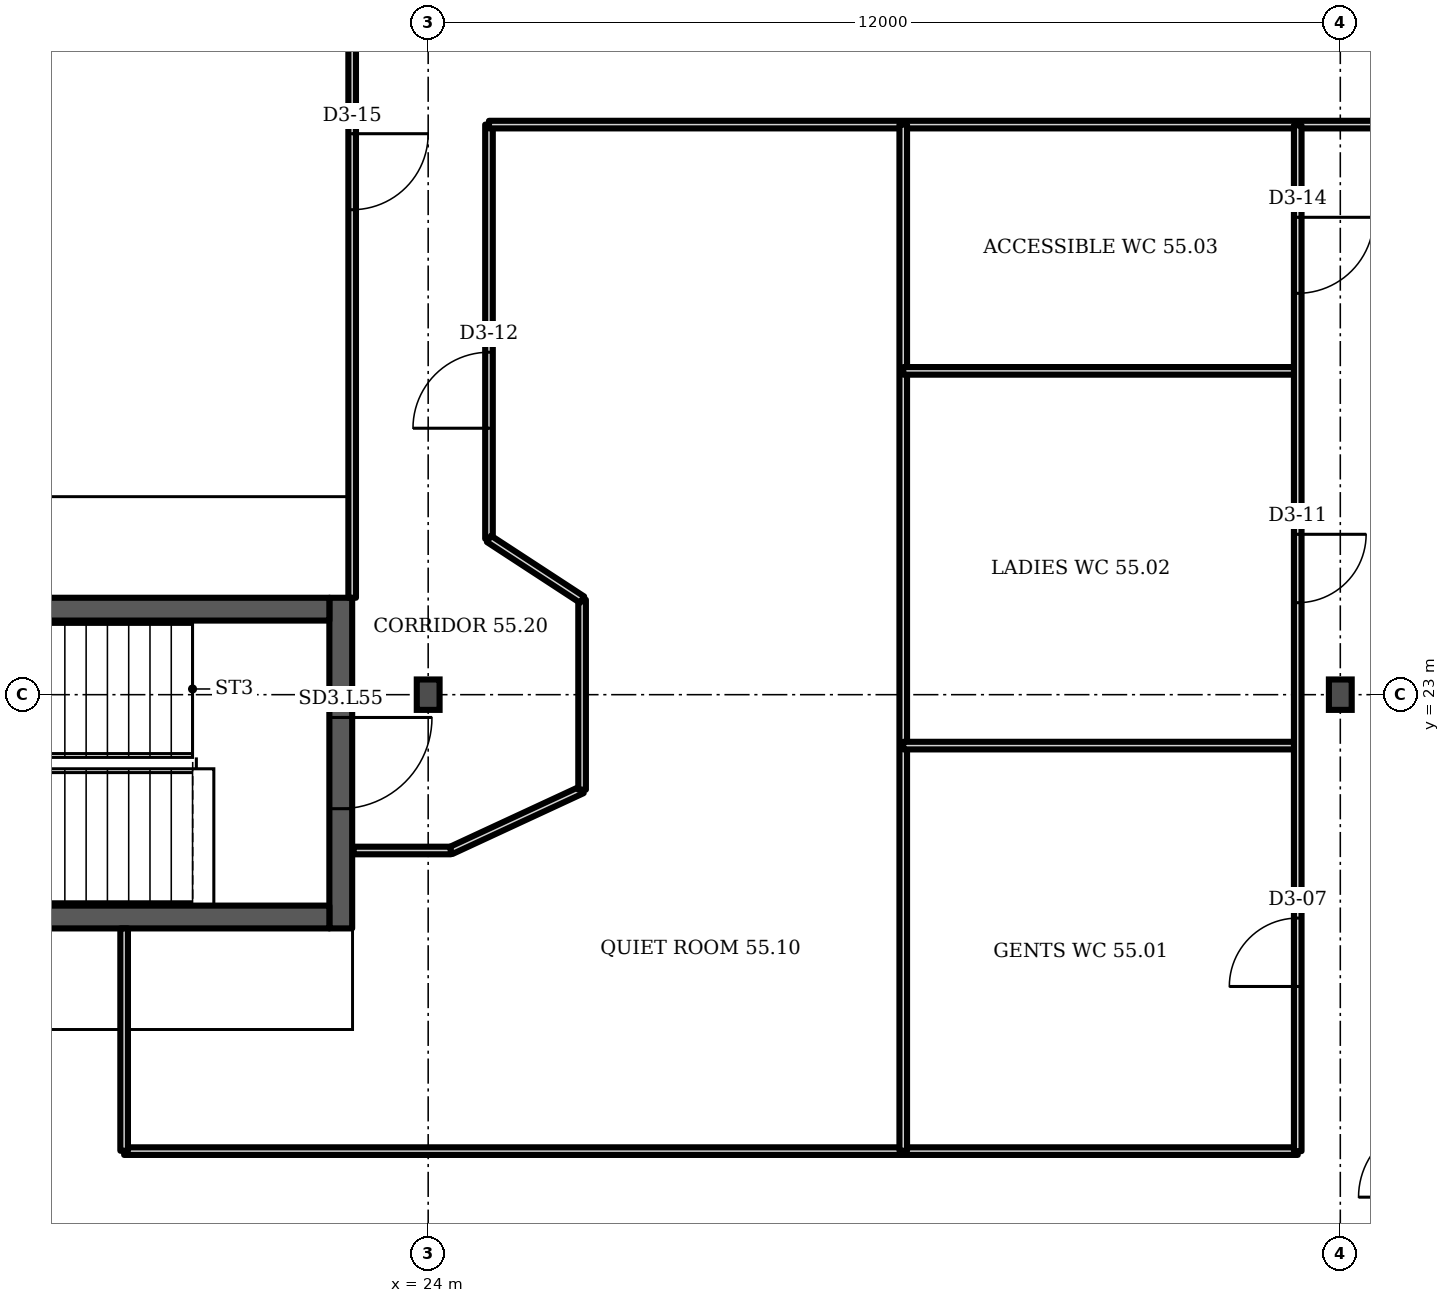
"""IFC4 building model, lengths in metres.
Left out: names, types, materials, properties, quantities, classifications, styles, units other than length and angle.
Written with IfcOpenShell. Run it as: python <this file> out.ifc"""

import sys

from ifc_helpers import new_model, si_unit, direction, frame, frame_2d, origin, origin_2d, place, context, subcontext, project, spatial, rectangle, i_section, extrude, element, fill, save


model = new_model("IFC4")
c1 = context("Model", 3, precision=1e-05, world=origin(), true_north=direction((0.0, 1.0)))
c2 = subcontext(c1, "Body", "Model", "MODEL_VIEW")
j1 = project(units=[si_unit("LENGTHUNIT", "METRE"), si_unit("PLANEANGLEUNIT", "RADIAN")], contexts=[c1])
p1 = place(None, origin())
s1 = spatial("IfcSite", under=j1, at=p1, CompositionType="ELEMENT")
p2 = place(p1, origin())
s2 = spatial("IfcBuilding", under=s1, at=p2, CompositionType="ELEMENT")
p3 = place(p2, frame((0.0, 0.0, 221.5)))
s3 = spatial("IfcBuildingStorey", under=s2, at=p3, CompositionType="ELEMENT", Elevation=221.5)
for number, where, z_axis, x_axis in (
    (1, (24.0, 23.0, 0.0), (0.0, 0.0, 1.0), (1.0, 0.0, 0.0)),
    (2, (36.0, 23.0, 0.0), (0.0, 0.0, 1.0), (1.0, 0.0, 0.0)),
):
    element("IfcColumn", number, at=place(p3, frame(where, z_axis=z_axis, x_axis=x_axis)), inside=s3, PredefinedType="COLUMN", context=c2, shape_type="SweptSolid", body=[
        extrude(i_section(OverallWidth=0.3, OverallDepth=0.4, WebThickness=0.013, FlangeThickness=0.024, FilletRadius=0.027, at=origin_2d()), origin(), (0.0, 0.0, 1.0), 3.6),
    ])
p4 = place(p3, frame((22.85, 19.925, 0.0), z_axis=(0.0, 0.0, 1.0), x_axis=(0.0, 1.0, 0.0)))
e3 = element("IfcWall", 3, at=p4, inside=s3, PredefinedType="SHEAR", context=c2, shape_type="SweptSolid", body=[
    extrude(rectangle(XDim=4.35, YDim=0.3, at=frame_2d((2.175, 0.0))), origin(), (0.0, 0.0, 1.0), 3.2),
])
p5 = place(p4, frame((1.575, 0.0, 0.0)))
e4 = element("IfcOpeningElement", 4, at=p5, cuts=e3, PredefinedType="OPENING", context=c2, shape_type="SweptSolid", body=[
    extrude(rectangle(XDim=1.2, YDim=2.1, at=frame_2d((0.6, 1.05))), frame((0.0, 0.16, 0.0), z_axis=(0.0, -1.0, 0.0), x_axis=(1.0, 0.0, 0.0)), (0.0, 0.0, 1.0), 0.32),
])
p6 = place(p3, frame((20.0, 16.995, 0.0), z_axis=(0.0, 0.0, 1.0), x_axis=(1.0, 0.0, 0.0)))
e5 = element("IfcWall", 5, at=p6, inside=s3, PredefinedType="PARTITIONING", context=c2, shape_type="SweptSolid", body=[
    extrude(rectangle(XDim=15.44, YDim=0.1, at=frame_2d((7.72, 0.0))), origin(), (0.0, 0.0, 1.0), 3.2),
])
p7 = place(p3, frame((20.0, 17.0, 0.0), z_axis=(0.0, 0.0, 1.0), x_axis=(0.0, 1.0, 0.0)))
e6 = element("IfcWall", 6, at=p7, inside=s3, PredefinedType="PARTITIONING", context=c2, shape_type="SweptSolid", body=[
    extrude(rectangle(XDim=2.925, YDim=0.1, at=frame_2d((1.462, 0.0))), origin(), (0.0, 0.0, 1.0), 3.2),
])
p8 = place(p3, frame((23.0, 24.275, 0.0), z_axis=(0.0, 0.0, 1.0), x_axis=(0.0, 1.0, 0.0)))
e7 = element("IfcWall", 7, at=p8, inside=s3, PredefinedType="PARTITIONING", context=c2, shape_type="SweptSolid", body=[
    extrude(rectangle(XDim=9.705, YDim=0.1, at=frame_2d((4.853, 0.0))), origin(), (0.0, 0.0, 1.0), 3.2),
])
p9 = place(p8, frame((5.105, 0.0, 0.0)))
e8 = element("IfcOpeningElement", 8, at=p9, cuts=e7, PredefinedType="OPENING", context=c2, shape_type="SweptSolid", body=[
    extrude(rectangle(XDim=1.0, YDim=2.1, at=frame_2d((0.5, 1.05))), frame((0.0, 0.06, 0.0), z_axis=(0.0, -1.0, 0.0), x_axis=(1.0, 0.0, 0.0)), (0.0, 0.0, 1.0), 0.12),
])
p10 = place(p3, frame((23.02, 20.95, 0.0), z_axis=(0.0, 0.0, 1.0), x_axis=(1.0, 0.0, 0.0)))
e9 = element("IfcWall", 9, at=p10, inside=s3, PredefinedType="PARTITIONING", context=c2, shape_type="SweptSolid", body=[
    extrude(rectangle(XDim=1.28, YDim=0.1, at=frame_2d((0.64, 0.0))), origin(), (0.0, 0.0, 1.0), 3.2),
])
p11 = place(p3, frame((24.3, 20.95, 0.0), z_axis=(0.0, 0.0, 1.0), x_axis=(0.907168, 0.420777, 0.0)))
e10 = element("IfcWall", 10, at=p11, inside=s3, PredefinedType="PARTITIONING", context=c2, shape_type="SweptSolid", body=[
    extrude(rectangle(XDim=1.901, YDim=0.1, at=frame_2d((0.951, 0.0))), origin(), (0.0, 0.0, 1.0), 3.2),
])
p12 = place(p3, frame((24.8, 25.05, 0.0), z_axis=(0.0, 0.0, 1.0), x_axis=(0.0, 1.0, 0.0)))
e11 = element("IfcWall", 11, at=p12, inside=s3, PredefinedType="PARTITIONING", context=c2, shape_type="SweptSolid", body=[
    extrude(rectangle(XDim=5.45, YDim=0.1, at=frame_2d((2.725, 0.0))), origin(), (0.0, 0.0, 1.0), 3.2),
])
p13 = place(p12, frame((1.455, 0.0, 0.0)))
e12 = element("IfcOpeningElement", 12, at=p13, cuts=e11, PredefinedType="OPENING", context=c2, shape_type="SweptSolid", body=[
    extrude(rectangle(XDim=1.0, YDim=2.1, at=frame_2d((0.5, 1.05))), frame((0.0, 0.06, 0.0), z_axis=(0.0, -1.0, 0.0), x_axis=(1.0, 0.0, 0.0)), (0.0, 0.0, 1.0), 0.12),
])
p14 = place(p3, frame((24.8, 30.5, 0.0), z_axis=(0.0, 0.0, 1.0), x_axis=(1.0, 0.0, 0.0)))
e13 = element("IfcWall", 13, at=p14, inside=s3, PredefinedType="PARTITIONING", context=c2, shape_type="SweptSolid", body=[
    extrude(rectangle(XDim=12.05, YDim=0.1, at=frame_2d((6.025, 0.0))), origin(), (0.0, 0.0, 1.0), 3.2),
])
p15 = place(p3, frame((26.025, 21.75, 0.0), z_axis=(0.0, 0.0, 1.0), x_axis=(0.0, 1.0, 0.0)))
e14 = element("IfcWall", 14, at=p15, inside=s3, PredefinedType="PARTITIONING", context=c2, shape_type="SweptSolid", body=[
    extrude(rectangle(XDim=2.5, YDim=0.1, at=frame_2d((1.25, 0.0))), origin(), (0.0, 0.0, 1.0), 3.2),
])
p16 = place(p3, frame((26.025, 24.25, 0.0), z_axis=(0.0, 0.0, 1.0), x_axis=(-0.837222, 0.546856, 0.0)))
e15 = element("IfcWall", 15, at=p16, inside=s3, PredefinedType="PARTITIONING", context=c2, shape_type="SweptSolid", body=[
    extrude(rectangle(XDim=1.463, YDim=0.1, at=frame_2d((0.731, 0.0))), origin(), (0.0, 0.0, 1.0), 3.2),
])
p17 = place(p3, frame((30.25, 17.0, 0.0), z_axis=(0.0, 0.0, 1.0), x_axis=(0.0, 1.0, 0.0)))
e16 = element("IfcWall", 16, at=p17, inside=s3, PredefinedType="PARTITIONING", context=c2, shape_type="SweptSolid", body=[
    extrude(rectangle(XDim=13.5, YDim=0.1, at=frame_2d((6.75, 0.0))), origin(), (0.0, 0.0, 1.0), 3.2),
])
for number, where, z_axis, x_axis in (
    (17, (30.25, 22.33, 0.0), (0.0, 0.0, 1.0), (1.0, 0.0, 0.0)),
    (18, (30.25, 27.26, 0.0), (0.0, 0.0, 1.0), (1.0, 0.0, 0.0)),
):
    element("IfcWall", number, at=place(p3, frame(where, z_axis=z_axis, x_axis=x_axis)), inside=s3, PredefinedType="PARTITIONING", context=c2, shape_type="SweptSolid", body=[
        extrude(rectangle(XDim=5.19, YDim=0.1, at=frame_2d((2.595, 0.0))), origin(), (0.0, 0.0, 1.0), 3.2),
    ])
p18 = place(p3, frame((35.44, 16.995, 0.0), z_axis=(0.0, 0.0, 1.0), x_axis=(0.0, 1.0, 0.0)))
e19 = element("IfcWall", 19, at=p18, inside=s3, PredefinedType="PARTITIONING", context=c2, shape_type="SweptSolid", body=[
    extrude(rectangle(XDim=13.495, YDim=0.1, at=frame_2d((6.748, 0.0))), origin(), (0.0, 0.0, 1.0), 3.2),
])
p19 = place(p18, frame((2.166, 0.0, 0.0)))
e20 = element("IfcOpeningElement", 20, at=p19, cuts=e19, PredefinedType="OPENING", context=c2, shape_type="SweptSolid", body=[
    extrude(rectangle(XDim=0.9, YDim=2.1, at=frame_2d((0.45, 1.05))), frame((0.0, 0.06, 0.0), z_axis=(0.0, -1.0, 0.0), x_axis=(1.0, 0.0, 0.0)), (0.0, 0.0, 1.0), 0.12),
])
p20 = place(p18, frame((7.215, 0.0, 0.0)))
e21 = element("IfcOpeningElement", 21, at=p20, cuts=e19, PredefinedType="OPENING", context=c2, shape_type="SweptSolid", body=[
    extrude(rectangle(XDim=0.9, YDim=2.1, at=frame_2d((0.45, 1.05))), frame((0.0, 0.06, 0.0), z_axis=(0.0, -1.0, 0.0), x_axis=(1.0, 0.0, 0.0)), (0.0, 0.0, 1.0), 0.12),
])
p21 = place(p18, frame((11.285, 0.0, 0.0)))
e22 = element("IfcOpeningElement", 22, at=p21, cuts=e19, PredefinedType="OPENING", context=c2, shape_type="SweptSolid", body=[
    extrude(rectangle(XDim=1.0, YDim=2.1, at=frame_2d((0.5, 1.05))), frame((0.0, 0.06, 0.0), z_axis=(0.0, -1.0, 0.0), x_axis=(1.0, 0.0, 0.0)), (0.0, 0.0, 1.0), 0.12),
])
for number, where, z_axis, x_axis in (
    (23, (15.2, 20.075, 0.0), (0.0, 0.0, 1.0), (1.0, 0.0, 0.0)),
    (24, (15.2, 24.125, 0.0), (0.0, 0.0, 1.0), (1.0, 0.0, 0.0)),
):
    element("IfcWall", number, at=place(p3, frame(where, z_axis=z_axis, x_axis=x_axis)), inside=s3, PredefinedType="SHEAR", context=c2, shape_type="SweptSolid", body=[
        extrude(rectangle(XDim=7.5, YDim=0.3, at=frame_2d((3.75, 0.0))), origin(), (0.0, 0.0, 1.0), 3.2),
    ])
p22 = place(p5, origin())
e25 = element("IfcDoor", 25, at=p22, inside=s3, OperationType="SINGLE_SWING_RIGHT", PredefinedType="DOOR", context=c2, shape_type="SweptSolid", body=[
    extrude(rectangle(XDim=1.2, YDim=2.1, at=frame_2d((0.6, 1.05))), frame((0.0, 0.025, 0.0), z_axis=(0.0, -1.0, 0.0), x_axis=(1.0, 0.0, 0.0)), (0.0, 0.0, 1.0), 0.05),
])
fill(e4, e25)
p23 = place(p19, origin())
e26 = element("IfcDoor", 26, at=p23, inside=s3, OperationType="SINGLE_SWING_LEFT", PredefinedType="DOOR", context=c2, shape_type="SweptSolid", body=[
    extrude(rectangle(XDim=0.9, YDim=2.1, at=frame_2d((0.45, 1.05))), frame((0.0, 0.025, 0.0), z_axis=(0.0, -1.0, 0.0), x_axis=(1.0, 0.0, 0.0)), (0.0, 0.0, 1.0), 0.05),
])
fill(e20, e26)
p24 = place(p20, origin())
e27 = element("IfcDoor", 27, at=p24, inside=s3, OperationType="SINGLE_SWING_RIGHT", PredefinedType="DOOR", context=c2, shape_type="SweptSolid", body=[
    extrude(rectangle(XDim=0.9, YDim=2.1, at=frame_2d((0.45, 1.05))), frame((0.0, 0.025, 0.0), z_axis=(0.0, -1.0, 0.0), x_axis=(1.0, 0.0, 0.0)), (0.0, 0.0, 1.0), 0.05),
])
fill(e21, e27)
p25 = place(p13, origin())
e28 = element("IfcDoor", 28, at=p25, inside=s3, OperationType="SINGLE_SWING_LEFT", PredefinedType="DOOR", context=c2, shape_type="SweptSolid", body=[
    extrude(rectangle(XDim=1.0, YDim=2.1, at=frame_2d((0.5, 1.05))), frame((0.0, 0.025, 0.0), z_axis=(0.0, -1.0, 0.0), x_axis=(1.0, 0.0, 0.0)), (0.0, 0.0, 1.0), 0.05),
])
fill(e12, e28)
p26 = place(p21, origin())
e29 = element("IfcDoor", 29, at=p26, inside=s3, OperationType="SINGLE_SWING_RIGHT", PredefinedType="DOOR", context=c2, shape_type="SweptSolid", body=[
    extrude(rectangle(XDim=1.0, YDim=2.1, at=frame_2d((0.5, 1.05))), frame((0.0, 0.025, 0.0), z_axis=(0.0, -1.0, 0.0), x_axis=(1.0, 0.0, 0.0)), (0.0, 0.0, 1.0), 0.05),
])
fill(e22, e29)
p27 = place(p9, origin())
e30 = element("IfcDoor", 30, at=p27, inside=s3, OperationType="SINGLE_SWING_RIGHT", PredefinedType="DOOR", context=c2, shape_type="SweptSolid", body=[
    extrude(rectangle(XDim=1.0, YDim=2.1, at=frame_2d((0.5, 1.05))), frame((0.0, 0.025, 0.0), z_axis=(0.0, -1.0, 0.0), x_axis=(1.0, 0.0, 0.0)), (0.0, 0.0, 1.0), 0.05),
])
fill(e8, e30)
save(model, sys.argv[1])
